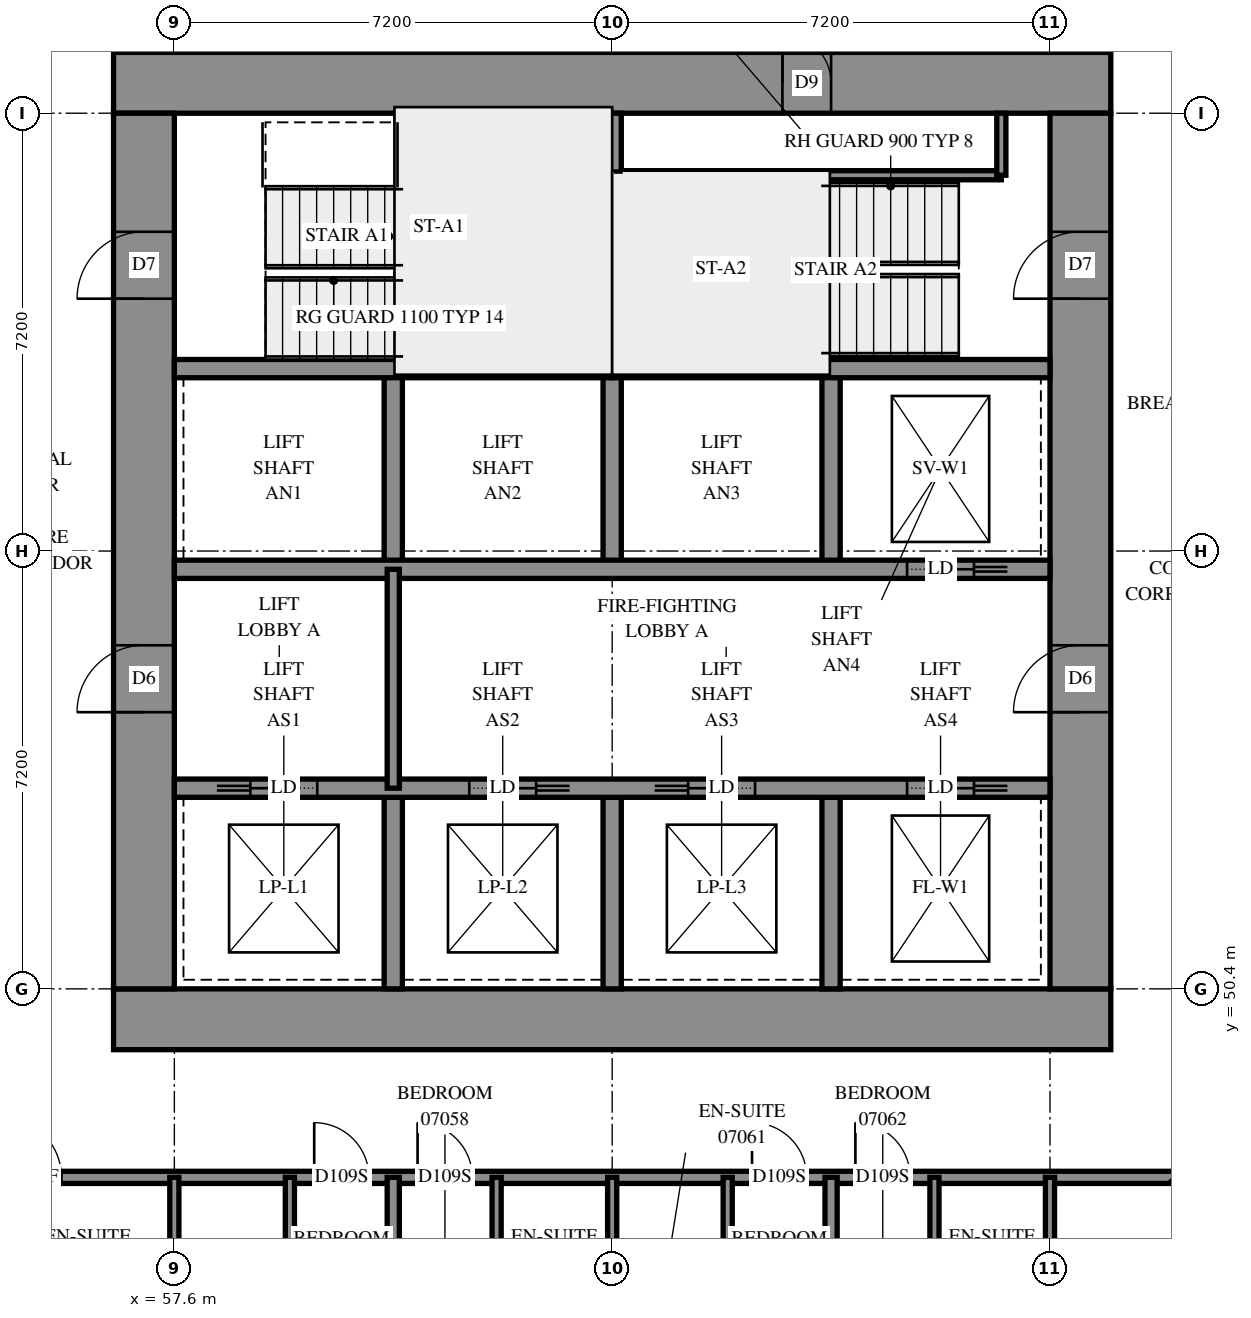
"""IFC4 building model, lengths in metres.
Left out: names, types, materials, properties, quantities, classifications, styles, units other than length and angle.
Written with IfcOpenShell. Run it as: python <this file> out.ifc"""

import sys

from ifc_helpers import new_model, si_unit, direction, frame, frame_2d, origin, place, context, subcontext, project, spatial, rectangle, extrude, element, fill, save


model = new_model("IFC4")
c1 = context("Model", 3, precision=1e-05, world=origin(), true_north=direction((0.0, 1.0)))
c2 = subcontext(c1, "Body", "Model", "MODEL_VIEW")
j1 = project(units=[si_unit("LENGTHUNIT", "METRE"), si_unit("PLANEANGLEUNIT", "RADIAN")], contexts=[c1])
p1 = place(None, origin())
s1 = spatial("IfcSite", under=j1, at=p1, CompositionType="ELEMENT")
p2 = place(p1, origin())
s2 = spatial("IfcBuilding", under=s1, at=p2, CompositionType="ELEMENT")
p3 = place(p2, frame((0.0, 0.0, 30.4)))
s3 = spatial("IfcBuildingStorey", under=s2, at=p3, CompositionType="ELEMENT", Elevation=30.4)
p4 = place(p3, frame((56.6, 49.9, -0.3), z_axis=(0.0, 0.0, 1.0), x_axis=(1.0, 0.0, 0.0)))
e1 = element("IfcWall", 1, at=p4, inside=s3, PredefinedType="SHEAR", context=c2, shape_type="SweptSolid", body=[
    extrude(rectangle(XDim=16.4, YDim=1.0, at=frame_2d((8.2, 0.0))), origin(), (0.0, 0.0, 1.0), 2.7),
])
p5 = place(p3, frame((56.6, 65.3, -0.3), z_axis=(0.0, 0.0, 1.0), x_axis=(1.0, 0.0, 0.0)))
e2 = element("IfcWall", 2, at=p5, inside=s3, PredefinedType="SHEAR", context=c2, shape_type="SweptSolid", body=[
    extrude(rectangle(XDim=16.4, YDim=1.0, at=frame_2d((8.2, 0.0))), origin(), (0.0, 0.0, 1.0), 2.7),
])
p6 = place(p5, frame((11.0, 0.0, 0.3)))
e3 = element("IfcOpeningElement", 3, at=p6, cuts=e2, PredefinedType="OPENING", context=c2, shape_type="SweptSolid", body=[
    extrude(rectangle(XDim=0.8, YDim=2.1, at=frame_2d((0.4, 1.05))), frame((0.0, 0.51, 0.0), z_axis=(0.0, -1.0, 0.0), x_axis=(1.0, 0.0, 0.0)), (0.0, 0.0, 1.0), 1.02),
])
p7 = place(p3, frame((57.1, 50.4, -0.3), z_axis=(0.0, 0.0, 1.0), x_axis=(0.0, 1.0, 0.0)))
e4 = element("IfcWall", 4, at=p7, inside=s3, PredefinedType="SHEAR", context=c2, shape_type="SweptSolid", body=[
    extrude(rectangle(XDim=14.4, YDim=1.0, at=frame_2d((7.2, 0.0))), origin(), (0.0, 0.0, 1.0), 2.7),
])
p8 = place(p7, frame((4.55, 0.0, 0.3)))
e5 = element("IfcOpeningElement", 5, at=p8, cuts=e4, PredefinedType="OPENING", context=c2, shape_type="SweptSolid", body=[
    extrude(rectangle(XDim=1.1, YDim=2.1, at=frame_2d((0.55, 1.05))), frame((0.0, 0.51, 0.0), z_axis=(0.0, -1.0, 0.0), x_axis=(1.0, 0.0, 0.0)), (0.0, 0.0, 1.0), 1.02),
])
p9 = place(p7, frame((11.35, 0.0, 0.3)))
e6 = element("IfcOpeningElement", 6, at=p9, cuts=e4, PredefinedType="OPENING", context=c2, shape_type="SweptSolid", body=[
    extrude(rectangle(XDim=1.1, YDim=2.1, at=frame_2d((0.55, 1.05))), frame((0.0, 0.51, 0.0), z_axis=(0.0, -1.0, 0.0), x_axis=(1.0, 0.0, 0.0)), (0.0, 0.0, 1.0), 1.02),
])
p10 = place(p3, frame((72.5, 50.4, -0.3), z_axis=(0.0, 0.0, 1.0), x_axis=(0.0, 1.0, 0.0)))
e7 = element("IfcWall", 7, at=p10, inside=s3, PredefinedType="SHEAR", context=c2, shape_type="SweptSolid", body=[
    extrude(rectangle(XDim=14.4, YDim=1.0, at=frame_2d((7.2, 0.0))), origin(), (0.0, 0.0, 1.0), 2.7),
])
p11 = place(p10, frame((4.55, 0.0, 0.3)))
e8 = element("IfcOpeningElement", 8, at=p11, cuts=e7, PredefinedType="OPENING", context=c2, shape_type="SweptSolid", body=[
    extrude(rectangle(XDim=1.1, YDim=2.1, at=frame_2d((0.55, 1.05))), frame((0.0, 0.51, 0.0), z_axis=(0.0, -1.0, 0.0), x_axis=(1.0, 0.0, 0.0)), (0.0, 0.0, 1.0), 1.02),
])
p12 = place(p10, frame((11.35, 0.0, 0.3)))
e9 = element("IfcOpeningElement", 9, at=p12, cuts=e7, PredefinedType="OPENING", context=c2, shape_type="SweptSolid", body=[
    extrude(rectangle(XDim=1.1, YDim=2.1, at=frame_2d((0.55, 1.05))), frame((0.0, 0.51, 0.0), z_axis=(0.0, -1.0, 0.0), x_axis=(1.0, 0.0, 0.0)), (0.0, 0.0, 1.0), 1.02),
])
for number, where, z_axis, x_axis in (
    (10, (61.2, 50.4, 0.0), (0.0, 0.0, 1.0), (0.0, 1.0, 0.0)),
    (11, (61.2, 57.3, 0.0), (0.0, 0.0, 1.0), (0.0, 1.0, 0.0)),
    (12, (64.8, 50.4, 0.0), (0.0, 0.0, 1.0), (0.0, 1.0, 0.0)),
    (13, (64.8, 57.3, 0.0), (0.0, 0.0, 1.0), (0.0, 1.0, 0.0)),
    (14, (68.4, 50.4, 0.0), (0.0, 0.0, 1.0), (0.0, 1.0, 0.0)),
    (15, (68.4, 57.3, 0.0), (0.0, 0.0, 1.0), (0.0, 1.0, 0.0)),
):
    element("IfcWall", number, at=place(p3, frame(where, z_axis=z_axis, x_axis=x_axis)), inside=s3, PredefinedType="SOLIDWALL", context=c2, shape_type="SweptSolid", body=[
        extrude(rectangle(XDim=3.3, YDim=0.3, at=frame_2d((1.65, 0.0))), origin(), (0.0, 0.0, 1.0), 3.1),
    ])
p13 = place(p3, frame((57.6, 53.7, 0.0), z_axis=(0.0, 0.0, 1.0), x_axis=(1.0, 0.0, 0.0)))
e16 = element("IfcWall", 16, at=p13, inside=s3, PredefinedType="SOLIDWALL", context=c2, shape_type="SweptSolid", body=[
    extrude(rectangle(XDim=14.4, YDim=0.3, at=frame_2d((7.2, 0.0))), origin(), (0.0, 0.0, 1.0), 3.1),
])
p14 = place(p13, frame((1.25, 0.0, 0.0)))
e17 = element("IfcOpeningElement", 17, at=p14, cuts=e16, PredefinedType="OPENING", context=c2, shape_type="SweptSolid", body=[
    extrude(rectangle(XDim=1.1, YDim=2.1, at=frame_2d((0.55, 1.05))), frame((0.0, 0.16, 0.0), z_axis=(0.0, -1.0, 0.0), x_axis=(1.0, 0.0, 0.0)), (0.0, 0.0, 1.0), 0.32),
])
p15 = place(p13, frame((4.85, 0.0, 0.0)))
e18 = element("IfcOpeningElement", 18, at=p15, cuts=e16, PredefinedType="OPENING", context=c2, shape_type="SweptSolid", body=[
    extrude(rectangle(XDim=1.1, YDim=2.1, at=frame_2d((0.55, 1.05))), frame((0.0, 0.16, 0.0), z_axis=(0.0, -1.0, 0.0), x_axis=(1.0, 0.0, 0.0)), (0.0, 0.0, 1.0), 0.32),
])
p16 = place(p13, frame((8.45, 0.0, 0.0)))
e19 = element("IfcOpeningElement", 19, at=p16, cuts=e16, PredefinedType="OPENING", context=c2, shape_type="SweptSolid", body=[
    extrude(rectangle(XDim=1.1, YDim=2.1, at=frame_2d((0.55, 1.05))), frame((0.0, 0.16, 0.0), z_axis=(0.0, -1.0, 0.0), x_axis=(1.0, 0.0, 0.0)), (0.0, 0.0, 1.0), 0.32),
])
p17 = place(p13, frame((12.05, 0.0, 0.0)))
e20 = element("IfcOpeningElement", 20, at=p17, cuts=e16, PredefinedType="OPENING", context=c2, shape_type="SweptSolid", body=[
    extrude(rectangle(XDim=1.1, YDim=2.1, at=frame_2d((0.55, 1.05))), frame((0.0, 0.16, 0.0), z_axis=(0.0, -1.0, 0.0), x_axis=(1.0, 0.0, 0.0)), (0.0, 0.0, 1.0), 0.32),
])
p18 = place(p3, frame((57.6, 57.3, 0.0), z_axis=(0.0, 0.0, 1.0), x_axis=(1.0, 0.0, 0.0)))
e21 = element("IfcWall", 21, at=p18, inside=s3, PredefinedType="SOLIDWALL", context=c2, shape_type="SweptSolid", body=[
    extrude(rectangle(XDim=14.4, YDim=0.3, at=frame_2d((7.2, 0.0))), origin(), (0.0, 0.0, 1.0), 3.1),
])
p19 = place(p18, frame((12.05, 0.0, 0.0)))
e22 = element("IfcOpeningElement", 22, at=p19, cuts=e21, PredefinedType="OPENING", context=c2, shape_type="SweptSolid", body=[
    extrude(rectangle(XDim=1.1, YDim=2.1, at=frame_2d((0.55, 1.05))), frame((0.0, 0.16, 0.0), z_axis=(0.0, -1.0, 0.0), x_axis=(1.0, 0.0, 0.0)), (0.0, 0.0, 1.0), 0.32),
])
for number, where, z_axis, x_axis in (
    (23, (57.6, 60.6, 0.0), (0.0, 0.0, 1.0), (1.0, 0.0, 0.0)),
    (24, (64.8, 60.6, 0.0), (0.0, 0.0, 1.0), (1.0, 0.0, 0.0)),
):
    element("IfcWall", number, at=place(p3, frame(where, z_axis=z_axis, x_axis=x_axis)), inside=s3, PredefinedType="SOLIDWALL", context=c2, shape_type="SweptSolid", body=[
        extrude(rectangle(XDim=7.2, YDim=0.3, at=frame_2d((3.6, 0.0))), origin(), (0.0, 0.0, 1.0), 3.1),
    ])
p20 = place(p3, frame((64.8, 60.6, 0.0), z_axis=(0.0, 0.0, 1.0), x_axis=(0.0, 1.0, 0.0)))
e25 = element("IfcWall", 25, at=p20, inside=s3, PredefinedType="SOLIDWALL", context=c2, shape_type="SweptSolid", body=[
    extrude(rectangle(XDim=4.2, YDim=0.3, at=frame_2d((2.1, 0.0))), origin(), (0.0, 0.0, 1.0), 3.1),
])
p21 = place(p3, frame((64.95, 63.78, 0.0), z_axis=(0.0, 0.0, 1.0), x_axis=(1.0, 0.0, 0.0)))
e26 = element("IfcWall", 26, at=p21, inside=s3, PredefinedType="PARTITIONING", context=c2, shape_type="SweptSolid", body=[
    extrude(rectangle(XDim=6.25, YDim=0.15, at=frame_2d((3.125, 0.0))), origin(), (0.0, 0.0, 1.0), 3.1),
])
p22 = place(p3, frame((71.2, 63.78, 0.0), z_axis=(0.0, 0.0, 1.0), x_axis=(0.0, 1.0, 0.0)))
e27 = element("IfcWall", 27, at=p22, inside=s3, PredefinedType="PARTITIONING", context=c2, shape_type="SweptSolid", body=[
    extrude(rectangle(XDim=1.02, YDim=0.15, at=frame_2d((0.51, 0.0))), origin(), (0.0, 0.0, 1.0), 3.1),
])
p23 = place(p3, frame((61.2, 53.7, 0.0), z_axis=(0.0, 0.0, 1.0), x_axis=(0.0, 1.0, 0.0)))
e28 = element("IfcWall", 28, at=p23, inside=s3, PredefinedType="PARTITIONING", context=c2, shape_type="SweptSolid", body=[
    extrude(rectangle(XDim=3.6, YDim=0.2, at=frame_2d((1.8, 0.0))), origin(), (0.0, 0.0, 1.0), 3.1),
])
p24 = place(p3, frame((54.5, 47.3, 0.0), z_axis=(0.0, 0.0, 1.0), x_axis=(1.0, 0.0, 0.0)))
e29 = element("IfcWall", 29, at=p24, inside=s3, PredefinedType="PARTITIONING", context=c2, shape_type="SweptSolid", body=[
    extrude(rectangle(XDim=19.56, YDim=0.2, at=frame_2d((9.78, 0.0))), origin(), (0.0, 0.0, 1.0), 3.1),
])
p25 = place(p24, frame((0.243, 0.0, 0.0)))
e30 = element("IfcOpeningElement", 30, at=p25, cuts=e29, PredefinedType="OPENING", context=c2, shape_type="SweptSolid", body=[
    extrude(rectangle(XDim=1.0, YDim=2.1, at=frame_2d((0.5, 1.05))), frame((0.0, 0.11, 0.0), z_axis=(0.0, -1.0, 0.0), x_axis=(1.0, 0.0, 0.0)), (0.0, 0.0, 1.0), 0.22),
])
p26 = place(p24, frame((5.4, 0.0, 0.0)))
e31 = element("IfcOpeningElement", 31, at=p26, cuts=e29, PredefinedType="OPENING", context=c2, shape_type="SweptSolid", body=[
    extrude(rectangle(XDim=0.9, YDim=2.1, at=frame_2d((0.45, 1.05))), frame((0.0, 0.11, 0.0), z_axis=(0.0, -1.0, 0.0), x_axis=(1.0, 0.0, 0.0)), (0.0, 0.0, 1.0), 0.22),
])
p27 = place(p24, frame((7.1, 0.0, 0.0)))
e32 = element("IfcOpeningElement", 32, at=p27, cuts=e29, PredefinedType="OPENING", context=c2, shape_type="SweptSolid", body=[
    extrude(rectangle(XDim=0.9, YDim=2.1, at=frame_2d((0.45, 1.05))), frame((0.0, 0.11, 0.0), z_axis=(0.0, -1.0, 0.0), x_axis=(1.0, 0.0, 0.0)), (0.0, 0.0, 1.0), 0.22),
])
p28 = place(p24, frame((12.6, 0.0, 0.0)))
e33 = element("IfcOpeningElement", 33, at=p28, cuts=e29, PredefinedType="OPENING", context=c2, shape_type="SweptSolid", body=[
    extrude(rectangle(XDim=0.9, YDim=2.1, at=frame_2d((0.45, 1.05))), frame((0.0, 0.11, 0.0), z_axis=(0.0, -1.0, 0.0), x_axis=(1.0, 0.0, 0.0)), (0.0, 0.0, 1.0), 0.22),
])
p29 = place(p24, frame((14.3, 0.0, 0.0)))
e34 = element("IfcOpeningElement", 34, at=p29, cuts=e29, PredefinedType="OPENING", context=c2, shape_type="SweptSolid", body=[
    extrude(rectangle(XDim=0.9, YDim=2.1, at=frame_2d((0.45, 1.05))), frame((0.0, 0.11, 0.0), z_axis=(0.0, -1.0, 0.0), x_axis=(1.0, 0.0, 0.0)), (0.0, 0.0, 1.0), 0.22),
])
p30 = place(p3, frame((68.4, 42.351, 0.0), z_axis=(0.0, 0.0, 1.0), x_axis=(0.0, 1.0, 0.0)))
e35 = element("IfcWall", 35, at=p30, inside=s3, PredefinedType="PARTITIONING", context=c2, shape_type="SweptSolid", body=[
    extrude(rectangle(XDim=4.949, YDim=0.2, at=frame_2d((2.475, 0.0))), origin(), (0.0, 0.0, 1.0), 3.1),
])
p31 = place(p3, frame((61.2, 42.385, 0.0), z_axis=(0.0, 0.0, 1.0), x_axis=(0.0, 1.0, 0.0)))
e36 = element("IfcWall", 36, at=p31, inside=s3, PredefinedType="PARTITIONING", context=c2, shape_type="SweptSolid", body=[
    extrude(rectangle(XDim=4.915, YDim=0.2, at=frame_2d((2.458, 0.0))), origin(), (0.0, 0.0, 1.0), 3.1),
])
p32 = place(p3, frame((74.057, 47.297, 0.0), z_axis=(0.0, 0.0, 1.0), x_axis=(0.7071067812, -0.7071067812, 0.0)))
e37 = element("IfcWall", 37, at=p32, inside=s3, PredefinedType="PARTITIONING", context=c2, shape_type="SweptSolid", body=[
    extrude(rectangle(XDim=4.653, YDim=0.2, at=frame_2d((2.326, 0.0))), origin(), (0.0, 0.0, 1.0), 3.1),
])
p33 = place(p32, frame((0.57, 0.0, 0.0)))
e38 = element("IfcOpeningElement", 38, at=p33, cuts=e37, PredefinedType="OPENING", context=c2, shape_type="SweptSolid", body=[
    extrude(rectangle(XDim=1.0, YDim=2.1, at=frame_2d((0.5, 1.05))), frame((0.0, 0.11, 0.0), z_axis=(0.0, -1.0, 0.0), x_axis=(1.0, 0.0, 0.0)), (0.0, 0.0, 1.0), 0.22),
])
for number, where, z_axis, x_axis in (
    (39, (59.5, 44.9, 0.0), (0.0, 0.0, 1.0), (0.0, 1.0, 0.0)),
    (40, (57.6, 44.9, 0.0), (0.0, 0.0, 1.0), (0.0, 1.0, 0.0)),
    (41, (62.9, 44.9, 0.0), (0.0, 0.0, 1.0), (0.0, 1.0, 0.0)),
    (42, (66.7, 44.9, 0.0), (0.0, 0.0, 1.0), (0.0, 1.0, 0.0)),
    (43, (64.8, 44.9, 0.0), (0.0, 0.0, 1.0), (0.0, 1.0, 0.0)),
    (44, (70.1, 44.9, 0.0), (0.0, 0.0, 1.0), (0.0, 1.0, 0.0)),
    (45, (72.0, 44.9, 0.0), (0.0, 0.0, 1.0), (0.0, 1.0, 0.0)),
):
    element("IfcWall", number, at=place(p3, frame(where, z_axis=z_axis, x_axis=x_axis)), inside=s3, PredefinedType="PARTITIONING", context=c2, shape_type="SweptSolid", body=[
        extrude(rectangle(XDim=2.4, YDim=0.15, at=frame_2d((1.2, 0.0))), origin(), (0.0, 0.0, 1.0), 3.1),
    ])
p34 = place(p6, origin())
e46 = element("IfcDoor", 46, at=p34, inside=s3, OperationType="SINGLE_SWING_RIGHT", PredefinedType="DOOR", context=c2, shape_type="SweptSolid", body=[
    extrude(rectangle(XDim=0.8, YDim=2.1, at=frame_2d((0.4, 1.05))), frame((0.0, -0.44, 0.0), z_axis=(0.0, -1.0, 0.0), x_axis=(1.0, 0.0, 0.0)), (0.0, 0.0, 1.0), 0.05),
])
fill(e3, e46)
p35 = place(p8, origin())
e47 = element("IfcDoor", 47, at=p35, inside=s3, OperationType="DOUBLE_DOOR_SINGLE_SWING", PredefinedType="DOOR", context=c2, shape_type="SweptSolid", body=[
    extrude(rectangle(XDim=1.1, YDim=2.1, at=frame_2d((0.55, 1.05))), frame((0.0, 0.025, 0.0), z_axis=(0.0, -1.0, 0.0), x_axis=(1.0, 0.0, 0.0)), (0.0, 0.0, 1.0), 0.05),
])
fill(e5, e47)
p36 = place(p11, origin())
e48 = element("IfcDoor", 48, at=p36, inside=s3, OperationType="DOUBLE_DOOR_SINGLE_SWING", PredefinedType="DOOR", context=c2, shape_type="SweptSolid", body=[
    extrude(rectangle(XDim=1.1, YDim=2.1, at=frame_2d((0.55, 1.05))), frame((0.0, 0.025, 0.0), z_axis=(0.0, -1.0, 0.0), x_axis=(1.0, 0.0, 0.0)), (0.0, 0.0, 1.0), 0.05),
])
fill(e8, e48)
p37 = place(p9, origin())
e49 = element("IfcDoor", 49, at=p37, inside=s3, OperationType="SINGLE_SWING_LEFT", PredefinedType="DOOR", context=c2, shape_type="SweptSolid", body=[
    extrude(rectangle(XDim=1.1, YDim=2.1, at=frame_2d((0.55, 1.05))), frame((0.0, 0.025, 0.0), z_axis=(0.0, -1.0, 0.0), x_axis=(1.0, 0.0, 0.0)), (0.0, 0.0, 1.0), 0.05),
])
fill(e6, e49)
p38 = place(p12, origin())
e50 = element("IfcDoor", 50, at=p38, inside=s3, OperationType="SINGLE_SWING_RIGHT", PredefinedType="DOOR", context=c2, shape_type="SweptSolid", body=[
    extrude(rectangle(XDim=1.1, YDim=2.1, at=frame_2d((0.55, 1.05))), frame((0.0, 0.025, 0.0), z_axis=(0.0, -1.0, 0.0), x_axis=(1.0, 0.0, 0.0)), (0.0, 0.0, 1.0), 0.05),
])
fill(e9, e50)
p39 = place(p14, origin())
e51 = element("IfcDoor", 51, at=p39, inside=s3, OperationType="SLIDING_TO_LEFT", PredefinedType="DOOR", context=c2, shape_type="SweptSolid", body=[
    extrude(rectangle(XDim=1.1, YDim=2.1, at=frame_2d((0.55, 1.05))), frame((0.0, 0.025, 0.0), z_axis=(0.0, -1.0, 0.0), x_axis=(1.0, 0.0, 0.0)), (0.0, 0.0, 1.0), 0.05),
])
fill(e17, e51)
p40 = place(p15, origin())
e52 = element("IfcDoor", 52, at=p40, inside=s3, OperationType="SLIDING_TO_RIGHT", PredefinedType="DOOR", context=c2, shape_type="SweptSolid", body=[
    extrude(rectangle(XDim=1.1, YDim=2.1, at=frame_2d((0.55, 1.05))), frame((0.0, 0.025, 0.0), z_axis=(0.0, -1.0, 0.0), x_axis=(1.0, 0.0, 0.0)), (0.0, 0.0, 1.0), 0.05),
])
fill(e18, e52)
p41 = place(p16, origin())
e53 = element("IfcDoor", 53, at=p41, inside=s3, OperationType="SLIDING_TO_LEFT", PredefinedType="DOOR", context=c2, shape_type="SweptSolid", body=[
    extrude(rectangle(XDim=1.1, YDim=2.1, at=frame_2d((0.55, 1.05))), frame((0.0, 0.025, 0.0), z_axis=(0.0, -1.0, 0.0), x_axis=(1.0, 0.0, 0.0)), (0.0, 0.0, 1.0), 0.05),
])
fill(e19, e53)
p42 = place(p17, origin())
e54 = element("IfcDoor", 54, at=p42, inside=s3, OperationType="SLIDING_TO_RIGHT", PredefinedType="DOOR", context=c2, shape_type="SweptSolid", body=[
    extrude(rectangle(XDim=1.1, YDim=2.1, at=frame_2d((0.55, 1.05))), frame((0.0, 0.025, 0.0), z_axis=(0.0, -1.0, 0.0), x_axis=(1.0, 0.0, 0.0)), (0.0, 0.0, 1.0), 0.05),
])
fill(e20, e54)
p43 = place(p19, origin())
e55 = element("IfcDoor", 55, at=p43, inside=s3, OperationType="SLIDING_TO_RIGHT", PredefinedType="DOOR", context=c2, shape_type="SweptSolid", body=[
    extrude(rectangle(XDim=1.1, YDim=2.1, at=frame_2d((0.55, 1.05))), frame((0.0, 0.025, 0.0), z_axis=(0.0, -1.0, 0.0), x_axis=(1.0, 0.0, 0.0)), (0.0, 0.0, 1.0), 0.05),
])
fill(e22, e55)
p44 = place(p25, origin())
e56 = element("IfcDoor", 56, at=p44, inside=s3, OperationType="SINGLE_SWING_RIGHT", PredefinedType="DOOR", context=c2, shape_type="SweptSolid", body=[
    extrude(rectangle(XDim=1.0, YDim=2.1, at=frame_2d((0.5, 1.05))), frame((0.0, 0.025, 0.0), z_axis=(0.0, -1.0, 0.0), x_axis=(1.0, 0.0, 0.0)), (0.0, 0.0, 1.0), 0.05),
])
fill(e30, e56)
p45 = place(p26, origin())
e57 = element("IfcDoor", 57, at=p45, inside=s3, OperationType="SINGLE_SWING_LEFT", PredefinedType="DOOR", context=c2, shape_type="SweptSolid", body=[
    extrude(rectangle(XDim=0.9, YDim=2.1, at=frame_2d((0.45, 1.05))), frame((0.0, 0.025, 0.0), z_axis=(0.0, -1.0, 0.0), x_axis=(1.0, 0.0, 0.0)), (0.0, 0.0, 1.0), 0.05),
])
fill(e31, e57)
p46 = place(p27, origin())
e58 = element("IfcDoor", 58, at=p46, inside=s3, OperationType="SINGLE_SWING_RIGHT", PredefinedType="DOOR", context=c2, shape_type="SweptSolid", body=[
    extrude(rectangle(XDim=0.9, YDim=2.1, at=frame_2d((0.45, 1.05))), frame((0.0, 0.025, 0.0), z_axis=(0.0, -1.0, 0.0), x_axis=(1.0, 0.0, 0.0)), (0.0, 0.0, 1.0), 0.05),
])
fill(e32, e58)
p47 = place(p28, origin())
e59 = element("IfcDoor", 59, at=p47, inside=s3, OperationType="SINGLE_SWING_LEFT", PredefinedType="DOOR", context=c2, shape_type="SweptSolid", body=[
    extrude(rectangle(XDim=0.9, YDim=2.1, at=frame_2d((0.45, 1.05))), frame((0.0, 0.025, 0.0), z_axis=(0.0, -1.0, 0.0), x_axis=(1.0, 0.0, 0.0)), (0.0, 0.0, 1.0), 0.05),
])
fill(e33, e59)
p48 = place(p29, origin())
e60 = element("IfcDoor", 60, at=p48, inside=s3, OperationType="SINGLE_SWING_RIGHT", PredefinedType="DOOR", context=c2, shape_type="SweptSolid", body=[
    extrude(rectangle(XDim=0.9, YDim=2.1, at=frame_2d((0.45, 1.05))), frame((0.0, 0.025, 0.0), z_axis=(0.0, -1.0, 0.0), x_axis=(1.0, 0.0, 0.0)), (0.0, 0.0, 1.0), 0.05),
])
fill(e34, e60)
save(model, sys.argv[1])
